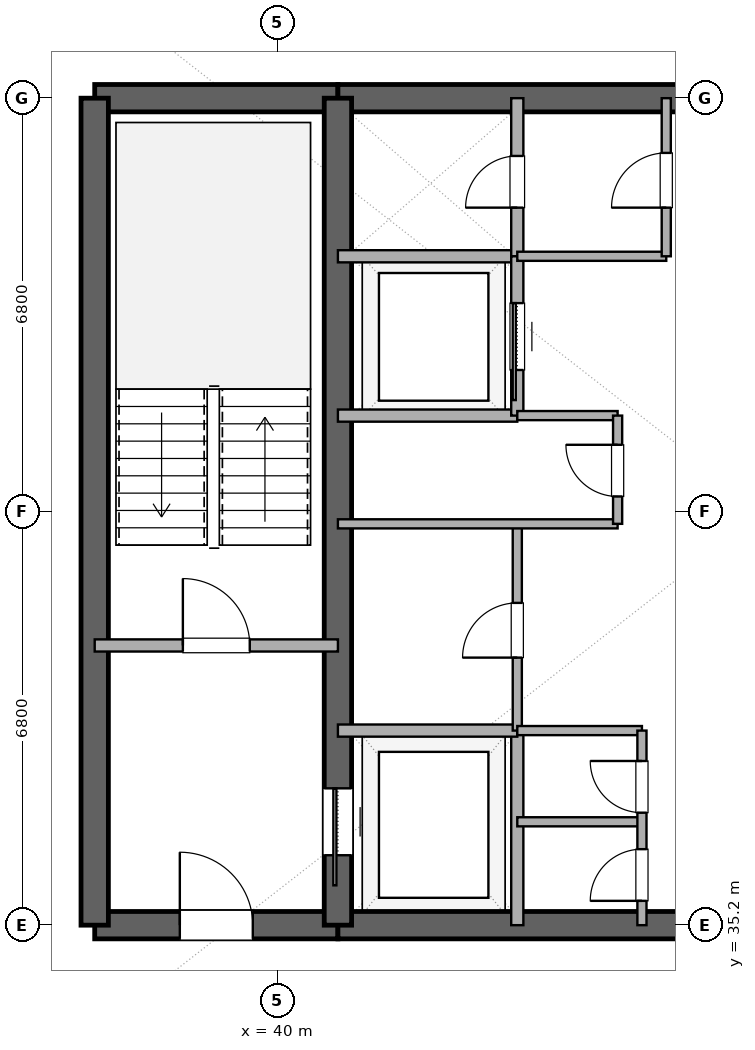
"""IFC4 building model, lengths in metres.
Left out: names, types, materials, properties, quantities, classifications, styles, units other than length and angle.
Written with IfcOpenShell. Run it as: python <this file> out.ifc"""

import sys

from ifc_helpers import new_model, si_unit, direction, frame, frame_2d, origin, place, context, subcontext, project, spatial, rectangle, extrude, element, fill, save


model = new_model("IFC4")
c1 = context("Model", 3, precision=1e-05, world=origin(), true_north=direction((0.0, 1.0)))
c2 = subcontext(c1, "Body", "Model", "MODEL_VIEW")
j1 = project(units=[si_unit("LENGTHUNIT", "METRE"), si_unit("PLANEANGLEUNIT", "RADIAN")], contexts=[c1])
p1 = place(None, origin())
s1 = spatial("IfcSite", under=j1, at=p1, CompositionType="ELEMENT")
p2 = place(p1, origin())
s2 = spatial("IfcBuilding", under=s1, at=p2, CompositionType="ELEMENT")
p3 = place(p2, frame((0.0, 0.0, 172.2)))
s3 = spatial("IfcBuildingStorey", under=s2, at=p3, CompositionType="ELEMENT", Elevation=172.2)
p4 = place(p3, frame((37.0, 35.2, 0.0), z_axis=(0.0, 0.0, 1.0), x_axis=(1.0, 0.0, 0.0)))
e1 = element("IfcWall", 1, at=p4, inside=s3, PredefinedType="SHEAR", context=c2, shape_type="SweptSolid", body=[
    extrude(rectangle(XDim=4.0, YDim=0.45, at=frame_2d((2.0, 0.0))), origin(), (0.0, 0.0, 1.0), 3.38),
])
p5 = place(p4, frame((1.4, 0.0, 0.0)))
e2 = element("IfcOpeningElement", 2, at=p5, cuts=e1, PredefinedType="OPENING", context=c2, shape_type="SweptSolid", body=[
    extrude(rectangle(XDim=1.2, YDim=2.15, at=frame_2d((0.6, 1.075))), frame((0.0, 0.235, 0.0), z_axis=(0.0, -1.0, 0.0), x_axis=(1.0, 0.0, 0.0)), (0.0, 0.0, 1.0), 0.47),
])
p6 = place(p3, frame((41.0, 35.2, 0.0), z_axis=(0.0, 0.0, 1.0), x_axis=(1.0, 0.0, 0.0)))
e3 = element("IfcWall", 3, at=p6, inside=s3, PredefinedType="SHEAR", context=c2, shape_type="SweptSolid", body=[
    extrude(rectangle(XDim=14.0, YDim=0.45, at=frame_2d((7.0, 0.0))), origin(), (0.0, 0.0, 1.0), 3.38),
])
p7 = place(p6, frame((6.1, 0.0, 0.0)))
e4 = element("IfcOpeningElement", 4, at=p7, cuts=e3, PredefinedType="OPENING", context=c2, shape_type="SweptSolid", body=[
    extrude(rectangle(XDim=1.8, YDim=2.25, at=frame_2d((0.9, 1.125))), frame((0.0, 0.235, 0.0), z_axis=(0.0, -1.0, 0.0), x_axis=(1.0, 0.0, 0.0)), (0.0, 0.0, 1.0), 0.47),
])
p8 = place(p3, frame((37.0, 48.8, 0.0), z_axis=(0.0, 0.0, 1.0), x_axis=(1.0, 0.0, 0.0)))
e5 = element("IfcWall", 5, at=p8, inside=s3, PredefinedType="SHEAR", context=c2, shape_type="SweptSolid", body=[
    extrude(rectangle(XDim=4.0, YDim=0.45, at=frame_2d((2.0, 0.0))), origin(), (0.0, 0.0, 1.0), 3.38),
])
p9 = place(p3, frame((41.0, 48.8, 0.0), z_axis=(0.0, 0.0, 1.0), x_axis=(1.0, 0.0, 0.0)))
e6 = element("IfcWall", 6, at=p9, inside=s3, PredefinedType="SHEAR", context=c2, shape_type="SweptSolid", body=[
    extrude(rectangle(XDim=14.0, YDim=0.45, at=frame_2d((7.0, 0.0))), origin(), (0.0, 0.0, 1.0), 3.38),
])
p10 = place(p9, frame((6.1, 0.0, 0.0)))
e7 = element("IfcOpeningElement", 7, at=p10, cuts=e6, PredefinedType="OPENING", context=c2, shape_type="SweptSolid", body=[
    extrude(rectangle(XDim=1.8, YDim=2.25, at=frame_2d((0.9, 1.125))), frame((0.0, 0.235, 0.0), z_axis=(0.0, -1.0, 0.0), x_axis=(1.0, 0.0, 0.0)), (0.0, 0.0, 1.0), 0.47),
])
p11 = place(p3, frame((37.0, 35.2, 0.0), z_axis=(0.0, 0.0, 1.0), x_axis=(0.0, 1.0, 0.0)))
e8 = element("IfcWall", 8, at=p11, inside=s3, PredefinedType="SHEAR", context=c2, shape_type="SweptSolid", body=[
    extrude(rectangle(XDim=13.6, YDim=0.45, at=frame_2d((6.8, 0.0))), origin(), (0.0, 0.0, 1.0), 3.38),
])
p12 = place(p3, frame((41.0, 35.2, 0.0), z_axis=(0.0, 0.0, 1.0), x_axis=(0.0, 1.0, 0.0)))
e9 = element("IfcWall", 9, at=p12, inside=s3, PredefinedType="SHEAR", context=c2, shape_type="SweptSolid", body=[
    extrude(rectangle(XDim=13.6, YDim=0.45, at=frame_2d((6.8, 0.0))), origin(), (0.0, 0.0, 1.0), 3.38),
])
p13 = place(p12, frame((1.15, 0.0, 0.0)))
e10 = element("IfcOpeningElement", 10, at=p13, cuts=e9, PredefinedType="OPENING", context=c2, shape_type="SweptSolid", body=[
    extrude(rectangle(XDim=1.1, YDim=2.2, at=frame_2d((0.55, 1.1))), frame((0.0, 0.235, 0.0), z_axis=(0.0, -1.0, 0.0), x_axis=(1.0, 0.0, 0.0)), (0.0, 0.0, 1.0), 0.47),
])
p14 = place(p3, frame((37.0, 39.8, 0.0), z_axis=(0.0, 0.0, 1.0), x_axis=(1.0, 0.0, 0.0)))
e11 = element("IfcWall", 11, at=p14, inside=s3, PredefinedType="SOLIDWALL", context=c2, shape_type="SweptSolid", body=[
    extrude(rectangle(XDim=4.0, YDim=0.2, at=frame_2d((2.0, 0.0))), origin(), (0.0, 0.0, 1.0), 2.74),
])
p15 = place(p14, frame((1.45, 0.0, 0.0)))
e12 = element("IfcOpeningElement", 12, at=p15, cuts=e11, PredefinedType="OPENING", context=c2, shape_type="SweptSolid", body=[
    extrude(rectangle(XDim=1.1, YDim=2.15, at=frame_2d((0.55, 1.075))), frame((0.0, 0.11, 0.0), z_axis=(0.0, -1.0, 0.0), x_axis=(1.0, 0.0, 0.0)), (0.0, 0.0, 1.0), 0.22),
])
p16 = place(p3, frame((43.95, 35.2, 0.0), z_axis=(0.0, 0.0, 1.0), x_axis=(0.0, 1.0, 0.0)))
e13 = element("IfcWall", 13, at=p16, inside=s3, PredefinedType="SOLIDWALL", context=c2, shape_type="SweptSolid", body=[
    extrude(rectangle(XDim=3.2, YDim=0.2, at=frame_2d((1.6, 0.0))), origin(), (0.0, 0.0, 1.0), 2.74),
])
for number, where, z_axis, x_axis in (
    (14, (41.0, 38.4, 0.0), (0.0, 0.0, 1.0), (1.0, 0.0, 0.0)),
    (15, (41.0, 46.2, 0.0), (0.0, 0.0, 1.0), (1.0, 0.0, 0.0)),
):
    element("IfcWall", number, at=place(p3, frame(where, z_axis=z_axis, x_axis=x_axis)), inside=s3, PredefinedType="SOLIDWALL", context=c2, shape_type="SweptSolid", body=[
        extrude(rectangle(XDim=2.95, YDim=0.2, at=frame_2d((1.475, 0.0))), origin(), (0.0, 0.0, 1.0), 2.74),
    ])
p17 = place(p3, frame((43.95, 46.2, 0.0), z_axis=(0.0, 0.0, 1.0), x_axis=(0.0, 1.0, 0.0)))
e16 = element("IfcWall", 16, at=p17, inside=s3, PredefinedType="SOLIDWALL", context=c2, shape_type="SweptSolid", body=[
    extrude(rectangle(XDim=2.6, YDim=0.2, at=frame_2d((1.3, 0.0))), origin(), (0.0, 0.0, 1.0), 2.74),
])
p18 = place(p17, frame((0.8, 0.0, 0.0)))
e17 = element("IfcOpeningElement", 17, at=p18, cuts=e16, PredefinedType="OPENING", context=c2, shape_type="SweptSolid", body=[
    extrude(rectangle(XDim=0.85, YDim=2.15, at=frame_2d((0.425, 1.075))), frame((0.0, 0.11, 0.0), z_axis=(0.0, -1.0, 0.0), x_axis=(1.0, 0.0, 0.0)), (0.0, 0.0, 1.0), 0.22),
])
p19 = place(p3, frame((41.0, 43.58, 0.0), z_axis=(0.0, 0.0, 1.0), x_axis=(1.0, 0.0, 0.0)))
e18 = element("IfcWall", 18, at=p19, inside=s3, PredefinedType="SOLIDWALL", context=c2, shape_type="SweptSolid", body=[
    extrude(rectangle(XDim=2.95, YDim=0.2, at=frame_2d((1.475, 0.0))), origin(), (0.0, 0.0, 1.0), 2.74),
])
p20 = place(p3, frame((43.95, 43.58, 0.0), z_axis=(0.0, 0.0, 1.0), x_axis=(0.0, 1.0, 0.0)))
e19 = element("IfcWall", 19, at=p20, inside=s3, PredefinedType="SOLIDWALL", context=c2, shape_type="SweptSolid", body=[
    extrude(rectangle(XDim=2.62, YDim=0.2, at=frame_2d((1.31, 0.0))), origin(), (0.0, 0.0, 1.0), 2.74),
])
p21 = place(p20, frame((0.75, 0.0, 0.0)))
e20 = element("IfcOpeningElement", 20, at=p21, cuts=e19, PredefinedType="OPENING", context=c2, shape_type="SweptSolid", body=[
    extrude(rectangle(XDim=1.1, YDim=2.2, at=frame_2d((0.55, 1.1))), frame((0.0, 0.11, 0.0), z_axis=(0.0, -1.0, 0.0), x_axis=(1.0, 0.0, 0.0)), (0.0, 0.0, 1.0), 0.22),
])
p22 = place(p3, frame((43.95, 38.4, 0.0), z_axis=(0.0, 0.0, 1.0), x_axis=(0.0, 1.0, 0.0)))
e21 = element("IfcWall", 21, at=p22, inside=s3, PredefinedType="PARTITIONING", context=c2, shape_type="SweptSolid", body=[
    extrude(rectangle(XDim=3.4, YDim=0.15, at=frame_2d((1.7, 0.0))), origin(), (0.0, 0.0, 1.0), 2.74),
])
p23 = place(p22, frame((1.2, 0.0, 0.0)))
e22 = element("IfcOpeningElement", 22, at=p23, cuts=e21, PredefinedType="OPENING", context=c2, shape_type="SweptSolid", body=[
    extrude(rectangle(XDim=0.9, YDim=2.15, at=frame_2d((0.45, 1.075))), frame((0.0, 0.085, 0.0), z_axis=(0.0, -1.0, 0.0), x_axis=(1.0, 0.0, 0.0)), (0.0, 0.0, 1.0), 0.17),
])
p24 = place(p3, frame((41.0, 41.8, 0.0), z_axis=(0.0, 0.0, 1.0), x_axis=(1.0, 0.0, 0.0)))
e23 = element("IfcWall", 23, at=p24, inside=s3, PredefinedType="PARTITIONING", context=c2, shape_type="SweptSolid", body=[
    extrude(rectangle(XDim=4.6, YDim=0.15, at=frame_2d((2.3, 0.0))), origin(), (0.0, 0.0, 1.0), 2.74),
])
p25 = place(p3, frame((43.95, 43.58, 0.0), z_axis=(0.0, 0.0, 1.0), x_axis=(1.0, 0.0, 0.0)))
e24 = element("IfcWall", 24, at=p25, inside=s3, PredefinedType="PARTITIONING", context=c2, shape_type="SweptSolid", body=[
    extrude(rectangle(XDim=1.65, YDim=0.15, at=frame_2d((0.825, 0.0))), origin(), (0.0, 0.0, 1.0), 2.74),
])
p26 = place(p3, frame((45.6, 41.8, 0.0), z_axis=(0.0, 0.0, 1.0), x_axis=(0.0, 1.0, 0.0)))
e25 = element("IfcWall", 25, at=p26, inside=s3, PredefinedType="PARTITIONING", context=c2, shape_type="SweptSolid", body=[
    extrude(rectangle(XDim=1.78, YDim=0.15, at=frame_2d((0.89, 0.0))), origin(), (0.0, 0.0, 1.0), 2.74),
])
p27 = place(p26, frame((0.45, 0.0, 0.0)))
e26 = element("IfcOpeningElement", 26, at=p27, cuts=e25, PredefinedType="OPENING", context=c2, shape_type="SweptSolid", body=[
    extrude(rectangle(XDim=0.85, YDim=2.15, at=frame_2d((0.425, 1.075))), frame((0.0, 0.085, 0.0), z_axis=(0.0, -1.0, 0.0), x_axis=(1.0, 0.0, 0.0)), (0.0, 0.0, 1.0), 0.17),
])
for number, where, z_axis, x_axis in (
    (27, (43.95, 36.9, 0.0), (0.0, 0.0, 1.0), (1.0, 0.0, 0.0)),
    (28, (43.95, 38.4, 0.0), (0.0, 0.0, 1.0), (1.0, 0.0, 0.0)),
):
    element("IfcWall", number, at=place(p3, frame(where, z_axis=z_axis, x_axis=x_axis)), inside=s3, PredefinedType="PARTITIONING", context=c2, shape_type="SweptSolid", body=[
        extrude(rectangle(XDim=2.05, YDim=0.15, at=frame_2d((1.025, 0.0))), origin(), (0.0, 0.0, 1.0), 2.74),
    ])
p28 = place(p3, frame((46.0, 35.2, 0.0), z_axis=(0.0, 0.0, 1.0), x_axis=(0.0, 1.0, 0.0)))
e29 = element("IfcWall", 29, at=p28, inside=s3, PredefinedType="PARTITIONING", context=c2, shape_type="SweptSolid", body=[
    extrude(rectangle(XDim=3.2, YDim=0.15, at=frame_2d((1.6, 0.0))), origin(), (0.0, 0.0, 1.0), 2.74),
])
p29 = place(p28, frame((0.4, 0.0, 0.0)))
e30 = element("IfcOpeningElement", 30, at=p29, cuts=e29, PredefinedType="OPENING", context=c2, shape_type="SweptSolid", body=[
    extrude(rectangle(XDim=0.85, YDim=2.15, at=frame_2d((0.425, 1.075))), frame((0.0, 0.085, 0.0), z_axis=(0.0, -1.0, 0.0), x_axis=(1.0, 0.0, 0.0)), (0.0, 0.0, 1.0), 0.17),
])
p30 = place(p28, frame((1.85, 0.0, 0.0)))
e31 = element("IfcOpeningElement", 31, at=p30, cuts=e29, PredefinedType="OPENING", context=c2, shape_type="SweptSolid", body=[
    extrude(rectangle(XDim=0.85, YDim=2.15, at=frame_2d((0.425, 1.075))), frame((0.0, 0.085, 0.0), z_axis=(0.0, -1.0, 0.0), x_axis=(1.0, 0.0, 0.0)), (0.0, 0.0, 1.0), 0.17),
])
p31 = place(p3, frame((43.95, 46.2, 0.0), z_axis=(0.0, 0.0, 1.0), x_axis=(1.0, 0.0, 0.0)))
e32 = element("IfcWall", 32, at=p31, inside=s3, PredefinedType="PARTITIONING", context=c2, shape_type="SweptSolid", body=[
    extrude(rectangle(XDim=2.45, YDim=0.15, at=frame_2d((1.225, 0.0))), origin(), (0.0, 0.0, 1.0), 2.74),
])
p32 = place(p3, frame((46.4, 46.2, 0.0), z_axis=(0.0, 0.0, 1.0), x_axis=(0.0, 1.0, 0.0)))
e33 = element("IfcWall", 33, at=p32, inside=s3, PredefinedType="PARTITIONING", context=c2, shape_type="SweptSolid", body=[
    extrude(rectangle(XDim=2.6, YDim=0.15, at=frame_2d((1.3, 0.0))), origin(), (0.0, 0.0, 1.0), 2.74),
])
p33 = place(p32, frame((0.8, 0.0, 0.0)))
e34 = element("IfcOpeningElement", 34, at=p33, cuts=e33, PredefinedType="OPENING", context=c2, shape_type="SweptSolid", body=[
    extrude(rectangle(XDim=0.9, YDim=2.15, at=frame_2d((0.45, 1.075))), frame((0.0, 0.085, 0.0), z_axis=(0.0, -1.0, 0.0), x_axis=(1.0, 0.0, 0.0)), (0.0, 0.0, 1.0), 0.17),
])
p34 = place(p13, origin())
e35 = element("IfcDoor", 35, at=p34, inside=s3, OperationType="SLIDING_TO_LEFT", PredefinedType="DOOR", context=c2, shape_type="SweptSolid", body=[
    extrude(rectangle(XDim=1.1, YDim=2.2, at=frame_2d((0.55, 1.1))), frame((0.0, 0.025, 0.0), z_axis=(0.0, -1.0, 0.0), x_axis=(1.0, 0.0, 0.0)), (0.0, 0.0, 1.0), 0.05),
])
fill(e10, e35)
p35 = place(p5, origin())
e36 = element("IfcDoor", 36, at=p35, inside=s3, OperationType="SINGLE_SWING_LEFT", PredefinedType="DOOR", context=c2, shape_type="SweptSolid", body=[
    extrude(rectangle(XDim=1.2, YDim=2.15, at=frame_2d((0.6, 1.075))), frame((0.0, 0.025, 0.0), z_axis=(0.0, -1.0, 0.0), x_axis=(1.0, 0.0, 0.0)), (0.0, 0.0, 1.0), 0.05),
])
fill(e2, e36)
p36 = place(p15, origin())
e37 = element("IfcDoor", 37, at=p36, inside=s3, OperationType="SINGLE_SWING_LEFT", PredefinedType="DOOR", context=c2, shape_type="SweptSolid", body=[
    extrude(rectangle(XDim=1.1, YDim=2.15, at=frame_2d((0.55, 1.075))), frame((0.0, 0.025, 0.0), z_axis=(0.0, -1.0, 0.0), x_axis=(1.0, 0.0, 0.0)), (0.0, 0.0, 1.0), 0.05),
])
fill(e12, e37)
p37 = place(p18, origin())
e38 = element("IfcDoor", 38, at=p37, inside=s3, OperationType="SINGLE_SWING_LEFT", PredefinedType="DOOR", context=c2, shape_type="SweptSolid", body=[
    extrude(rectangle(XDim=0.85, YDim=2.15, at=frame_2d((0.425, 1.075))), frame((0.0, 0.025, 0.0), z_axis=(0.0, -1.0, 0.0), x_axis=(1.0, 0.0, 0.0)), (0.0, 0.0, 1.0), 0.05),
])
fill(e17, e38)
p38 = place(p21, origin())
e39 = element("IfcDoor", 39, at=p38, inside=s3, OperationType="SLIDING_TO_LEFT", PredefinedType="DOOR", context=c2, shape_type="SweptSolid", body=[
    extrude(rectangle(XDim=1.1, YDim=2.2, at=frame_2d((0.55, 1.1))), frame((0.0, 0.025, 0.0), z_axis=(0.0, -1.0, 0.0), x_axis=(1.0, 0.0, 0.0)), (0.0, 0.0, 1.0), 0.05),
])
fill(e20, e39)
p39 = place(p23, origin())
e40 = element("IfcDoor", 40, at=p39, inside=s3, OperationType="SINGLE_SWING_LEFT", PredefinedType="DOOR", context=c2, shape_type="SweptSolid", body=[
    extrude(rectangle(XDim=0.9, YDim=2.15, at=frame_2d((0.45, 1.075))), frame((0.0, 0.025, 0.0), z_axis=(0.0, -1.0, 0.0), x_axis=(1.0, 0.0, 0.0)), (0.0, 0.0, 1.0), 0.05),
])
fill(e22, e40)
p40 = place(p27, origin())
e41 = element("IfcDoor", 41, at=p40, inside=s3, OperationType="SINGLE_SWING_RIGHT", PredefinedType="DOOR", context=c2, shape_type="SweptSolid", body=[
    extrude(rectangle(XDim=0.85, YDim=2.15, at=frame_2d((0.425, 1.075))), frame((0.0, 0.025, 0.0), z_axis=(0.0, -1.0, 0.0), x_axis=(1.0, 0.0, 0.0)), (0.0, 0.0, 1.0), 0.05),
])
fill(e26, e41)
p41 = place(p29, origin())
e42 = element("IfcDoor", 42, at=p41, inside=s3, OperationType="SINGLE_SWING_LEFT", PredefinedType="DOOR", context=c2, shape_type="SweptSolid", body=[
    extrude(rectangle(XDim=0.85, YDim=2.15, at=frame_2d((0.425, 1.075))), frame((0.0, 0.025, 0.0), z_axis=(0.0, -1.0, 0.0), x_axis=(1.0, 0.0, 0.0)), (0.0, 0.0, 1.0), 0.05),
])
fill(e30, e42)
p42 = place(p30, origin())
e43 = element("IfcDoor", 43, at=p42, inside=s3, OperationType="SINGLE_SWING_RIGHT", PredefinedType="DOOR", context=c2, shape_type="SweptSolid", body=[
    extrude(rectangle(XDim=0.85, YDim=2.15, at=frame_2d((0.425, 1.075))), frame((0.0, 0.025, 0.0), z_axis=(0.0, -1.0, 0.0), x_axis=(1.0, 0.0, 0.0)), (0.0, 0.0, 1.0), 0.05),
])
fill(e31, e43)
p43 = place(p33, origin())
e44 = element("IfcDoor", 44, at=p43, inside=s3, OperationType="SINGLE_SWING_LEFT", PredefinedType="DOOR", context=c2, shape_type="SweptSolid", body=[
    extrude(rectangle(XDim=0.9, YDim=2.15, at=frame_2d((0.45, 1.075))), frame((0.0, 0.025, 0.0), z_axis=(0.0, -1.0, 0.0), x_axis=(1.0, 0.0, 0.0)), (0.0, 0.0, 1.0), 0.05),
])
fill(e34, e44)
save(model, sys.argv[1])
